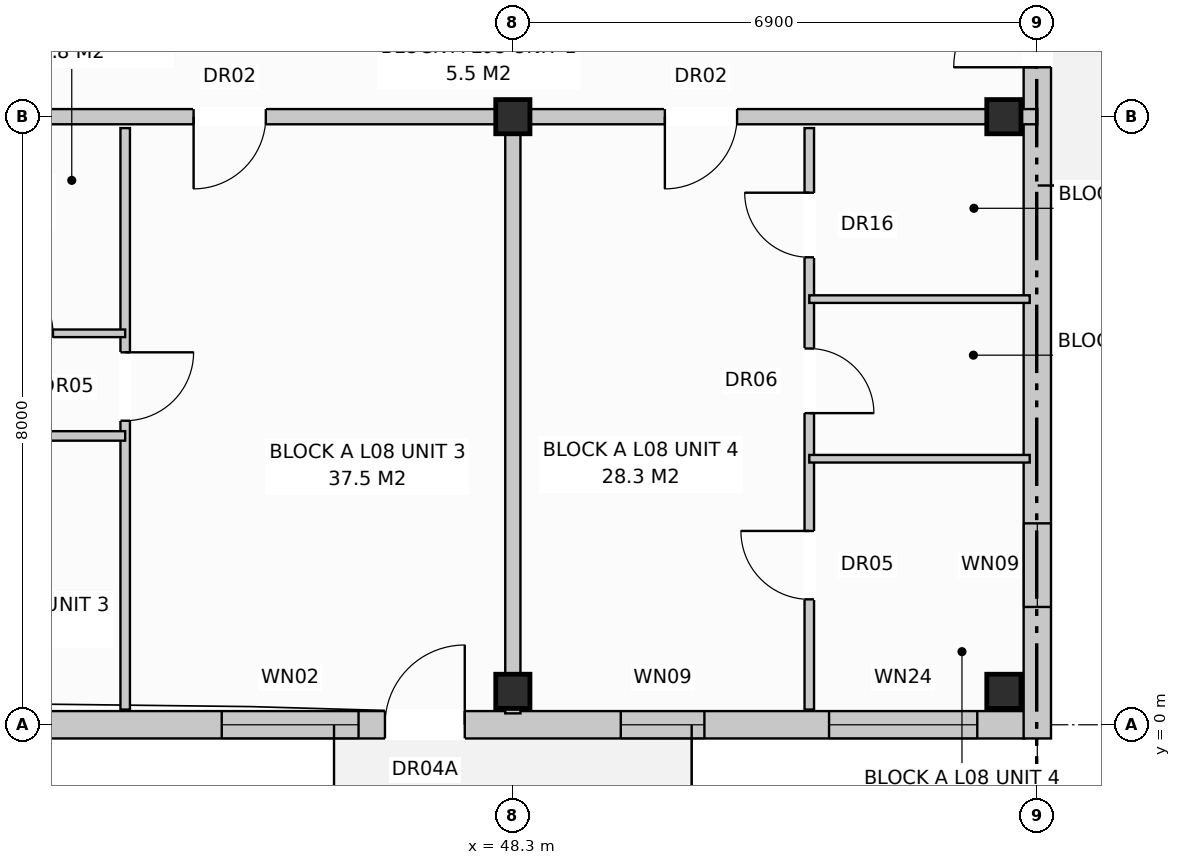
"""IFC4 building model, lengths in metres.
Left out: names, types, materials, properties, quantities, classifications, styles, units other than length and angle.
Written with IfcOpenShell. Run it as: python <this file> out.ifc"""

import sys

from ifc_helpers import new_model, si_unit, direction, frame, frame_2d, origin, origin_with_axes, origin_2d, place, context, subcontext, project, spatial, rectangle, extrude, element, fill, save


model = new_model("IFC4")
c1 = context("Model", 3, precision=1e-05, world=origin(), true_north=direction((0.0, 1.0)))
c2 = subcontext(c1, "Body", "Model", "MODEL_VIEW")
j1 = project(units=[si_unit("LENGTHUNIT", "METRE"), si_unit("PLANEANGLEUNIT", "RADIAN")], contexts=[c1])
p1 = place(None, origin())
s1 = spatial("IfcSite", under=j1, at=p1, CompositionType="ELEMENT")
p2 = place(p1, origin())
s2 = spatial("IfcBuilding", under=s1, at=p2, CompositionType="ELEMENT")
p3 = place(p2, frame((0.0, 0.0, 27.2)))
s3 = spatial("IfcBuildingStorey", under=s2, at=p3, CompositionType="ELEMENT", Elevation=27.2)
for number, where, z_axis, x_axis in (
    (1, (48.3, 0.44, 0.0), (0.0, 0.0, 1.0), (1.0, 0.0, 0.0)),
    (2, (48.3, 8.0, 0.0), (0.0, 0.0, 1.0), (1.0, 0.0, 0.0)),
    (3, (54.76, 0.44, 0.0), (0.0, 0.0, 1.0), (1.0, 0.0, 0.0)),
    (4, (54.76, 8.0, 0.0), (0.0, 0.0, 1.0), (1.0, 0.0, 0.0)),
):
    element("IfcColumn", number, at=place(p3, frame(where, z_axis=z_axis, x_axis=x_axis)), inside=s3, PredefinedType="COLUMN", context=c2, shape_type="SweptSolid", body=[
        extrude(rectangle(XDim=0.45, YDim=0.45, at=origin_2d()), origin(), (0.0, 0.0, 1.0), 3.2),
    ])
p4 = place(p3, frame((0.17, 0.0, 0.0), z_axis=(0.0, 0.0, 1.0), x_axis=(1.0, 0.0, 0.0)))
e5 = element("IfcWall", 5, at=p4, inside=s3, PredefinedType="STANDARD", context=c2, shape_type="SweptSolid", body=[
    extrude(rectangle(XDim=54.86, YDim=0.36, at=frame_2d((27.43, 0.0))), origin(), (0.0, 0.0, 1.0), 2.96),
])
p5 = place(p4, frame((3.75, 0.0, 0.0)))
e6 = element("IfcOpeningElement", 6, at=p5, cuts=e5, PredefinedType="OPENING", context=c2, shape_type="SweptSolid", body=[
    extrude(rectangle(XDim=1.05, YDim=2.12, at=frame_2d((0.525, 1.06))), frame((0.0, 0.192, 0.0), z_axis=(0.0, -1.0, 0.0), x_axis=(1.0, 0.0, 0.0)), (0.0, 0.0, 1.0), 0.384),
])
p6 = place(p4, frame((18.65, 0.0, 0.0)))
e7 = element("IfcOpeningElement", 7, at=p6, cuts=e5, PredefinedType="OPENING", context=c2, shape_type="SweptSolid", body=[
    extrude(rectangle(XDim=1.05, YDim=2.12, at=frame_2d((0.525, 1.06))), frame((0.0, 0.192, 0.0), z_axis=(0.0, -1.0, 0.0), x_axis=(1.0, 0.0, 0.0)), (0.0, 0.0, 1.0), 0.384),
])
p7 = place(p4, frame((29.05, 0.0, 0.0)))
e8 = element("IfcOpeningElement", 8, at=p7, cuts=e5, PredefinedType="OPENING", context=c2, shape_type="SweptSolid", body=[
    extrude(rectangle(XDim=1.05, YDim=2.12, at=frame_2d((0.525, 1.06))), frame((0.0, 0.192, 0.0), z_axis=(0.0, -1.0, 0.0), x_axis=(1.0, 0.0, 0.0)), (0.0, 0.0, 1.0), 0.384),
])
p8 = place(p4, frame((46.447, 0.0, 0.0)))
e9 = element("IfcOpeningElement", 9, at=p8, cuts=e5, PredefinedType="OPENING", context=c2, shape_type="SweptSolid", body=[
    extrude(rectangle(XDim=1.05, YDim=2.12, at=frame_2d((0.525, 1.06))), frame((0.0, 0.192, 0.0), z_axis=(0.0, -1.0, 0.0), x_axis=(1.0, 0.0, 0.0)), (0.0, 0.0, 1.0), 0.384),
])
p9 = place(p4, frame((1.6, 0.0, 0.8)))
e10 = element("IfcOpeningElement", 10, at=p9, cuts=e5, PredefinedType="OPENING", context=c2, shape_type="SweptSolid", body=[
    extrude(rectangle(XDim=1.8, YDim=1.7, at=frame_2d((0.9, 0.85))), frame((0.0, 0.192, 0.0), z_axis=(0.0, -1.0, 0.0), x_axis=(1.0, 0.0, 0.0)), (0.0, 0.0, 1.0), 0.384),
])
p10 = place(p4, frame((7.232, 0.0, 0.72)))
e11 = element("IfcOpeningElement", 11, at=p10, cuts=e5, PredefinedType="OPENING", context=c2, shape_type="SweptSolid", body=[
    extrude(rectangle(XDim=1.9, YDim=1.85, at=frame_2d((0.95, 0.925))), frame((0.0, 0.192, 0.0), z_axis=(0.0, -1.0, 0.0), x_axis=(1.0, 0.0, 0.0)), (0.0, 0.0, 1.0), 0.384),
])
p11 = place(p4, frame((10.85, 0.0, 0.72)))
e12 = element("IfcOpeningElement", 12, at=p11, cuts=e5, PredefinedType="OPENING", context=c2, shape_type="SweptSolid", body=[
    extrude(rectangle(XDim=1.1, YDim=1.5, at=frame_2d((0.55, 0.75))), frame((0.0, 0.192, 0.0), z_axis=(0.0, -1.0, 0.0), x_axis=(1.0, 0.0, 0.0)), (0.0, 0.0, 1.0), 0.384),
])
p12 = place(p4, frame((15.9, 0.0, 0.8)))
e13 = element("IfcOpeningElement", 13, at=p12, cuts=e5, PredefinedType="OPENING", context=c2, shape_type="SweptSolid", body=[
    extrude(rectangle(XDim=1.8, YDim=1.7, at=frame_2d((0.9, 0.85))), frame((0.0, 0.192, 0.0), z_axis=(0.0, -1.0, 0.0), x_axis=(1.0, 0.0, 0.0)), (0.0, 0.0, 1.0), 0.384),
])
p13 = place(p4, frame((21.55, 0.0, 0.72)))
e14 = element("IfcOpeningElement", 14, at=p13, cuts=e5, PredefinedType="OPENING", context=c2, shape_type="SweptSolid", body=[
    extrude(rectangle(XDim=1.9, YDim=1.85, at=frame_2d((0.95, 0.925))), frame((0.0, 0.192, 0.0), z_axis=(0.0, -1.0, 0.0), x_axis=(1.0, 0.0, 0.0)), (0.0, 0.0, 1.0), 0.384),
])
p14 = place(p4, frame((25.6, 0.0, 0.72)))
e15 = element("IfcOpeningElement", 15, at=p14, cuts=e5, PredefinedType="OPENING", context=c2, shape_type="SweptSolid", body=[
    extrude(rectangle(XDim=1.1, YDim=1.5, at=frame_2d((0.55, 0.75))), frame((0.0, 0.192, 0.0), z_axis=(0.0, -1.0, 0.0), x_axis=(1.0, 0.0, 0.0)), (0.0, 0.0, 1.0), 0.384),
])
p15 = place(p4, frame((31.4, 0.0, 0.8)))
e16 = element("IfcOpeningElement", 16, at=p15, cuts=e5, PredefinedType="OPENING", context=c2, shape_type="SweptSolid", body=[
    extrude(rectangle(XDim=1.8, YDim=1.7, at=frame_2d((0.9, 0.85))), frame((0.0, 0.192, 0.0), z_axis=(0.0, -1.0, 0.0), x_axis=(1.0, 0.0, 0.0)), (0.0, 0.0, 1.0), 0.384),
])
p16 = place(p4, frame((35.55, 0.0, 0.72)))
e17 = element("IfcOpeningElement", 17, at=p16, cuts=e5, PredefinedType="OPENING", context=c2, shape_type="SweptSolid", body=[
    extrude(rectangle(XDim=1.9, YDim=1.85, at=frame_2d((0.95, 0.925))), frame((0.0, 0.192, 0.0), z_axis=(0.0, -1.0, 0.0), x_axis=(1.0, 0.0, 0.0)), (0.0, 0.0, 1.0), 0.384),
])
p17 = place(p4, frame((39.25, 0.0, 0.72)))
e18 = element("IfcOpeningElement", 18, at=p17, cuts=e5, PredefinedType="OPENING", context=c2, shape_type="SweptSolid", body=[
    extrude(rectangle(XDim=1.1, YDim=1.5, at=frame_2d((0.55, 0.75))), frame((0.0, 0.192, 0.0), z_axis=(0.0, -1.0, 0.0), x_axis=(1.0, 0.0, 0.0)), (0.0, 0.0, 1.0), 0.384),
])
p18 = place(p4, frame((44.3, 0.0, 0.8)))
e19 = element("IfcOpeningElement", 19, at=p18, cuts=e5, PredefinedType="OPENING", context=c2, shape_type="SweptSolid", body=[
    extrude(rectangle(XDim=1.8, YDim=1.7, at=frame_2d((0.9, 0.85))), frame((0.0, 0.192, 0.0), z_axis=(0.0, -1.0, 0.0), x_axis=(1.0, 0.0, 0.0)), (0.0, 0.0, 1.0), 0.384),
])
p19 = place(p4, frame((49.55, 0.0, 0.72)))
e20 = element("IfcOpeningElement", 20, at=p19, cuts=e5, PredefinedType="OPENING", context=c2, shape_type="SweptSolid", body=[
    extrude(rectangle(XDim=1.1, YDim=1.5, at=frame_2d((0.55, 0.75))), frame((0.0, 0.192, 0.0), z_axis=(0.0, -1.0, 0.0), x_axis=(1.0, 0.0, 0.0)), (0.0, 0.0, 1.0), 0.384),
])
p20 = place(p4, frame((52.29, 0.0, 0.8)))
e21 = element("IfcOpeningElement", 21, at=p20, cuts=e5, PredefinedType="OPENING", context=c2, shape_type="SweptSolid", body=[
    extrude(rectangle(XDim=1.95, YDim=1.65, at=frame_2d((0.975, 0.825))), frame((0.0, 0.192, 0.0), z_axis=(0.0, -1.0, 0.0), x_axis=(1.0, 0.0, 0.0)), (0.0, 0.0, 1.0), 0.384),
])
p21 = place(p3, frame((55.2, -0.18, 0.0), z_axis=(0.0, 0.0, 1.0), x_axis=(0.0, 1.0, 0.0)))
e22 = element("IfcWall", 22, at=p21, inside=s3, PredefinedType="STANDARD", context=c2, shape_type="SweptSolid", body=[
    extrude(rectangle(XDim=18.76, YDim=0.36, at=frame_2d((9.38, 0.0))), origin(), (0.0, 0.0, 1.0), 2.96),
])
p22 = place(p21, frame((8.83, 0.0, 0.0)))
e23 = element("IfcOpeningElement", 23, at=p22, cuts=e22, PredefinedType="OPENING", context=c2, shape_type="SweptSolid", body=[
    extrude(rectangle(XDim=1.1, YDim=2.1, at=frame_2d((0.55, 1.05))), frame((0.0, 0.192, 0.0), z_axis=(0.0, -1.0, 0.0), x_axis=(1.0, 0.0, 0.0)), (0.0, 0.0, 1.0), 0.384),
])
p23 = place(p21, frame((1.73, 0.0, 0.72)))
e24 = element("IfcOpeningElement", 24, at=p23, cuts=e22, PredefinedType="OPENING", context=c2, shape_type="SweptSolid", body=[
    extrude(rectangle(XDim=1.1, YDim=1.5, at=frame_2d((0.55, 0.75))), frame((0.0, 0.192, 0.0), z_axis=(0.0, -1.0, 0.0), x_axis=(1.0, 0.0, 0.0)), (0.0, 0.0, 1.0), 0.384),
])
p24 = place(p21, frame((15.93, 0.0, 0.72)))
e25 = element("IfcOpeningElement", 25, at=p24, cuts=e22, PredefinedType="OPENING", context=c2, shape_type="SweptSolid", body=[
    extrude(rectangle(XDim=1.1, YDim=1.5, at=frame_2d((0.55, 0.75))), frame((0.0, 0.192, 0.0), z_axis=(0.0, -1.0, 0.0), x_axis=(1.0, 0.0, 0.0)), (0.0, 0.0, 1.0), 0.384),
])
p25 = place(p3, frame((48.3, 7.85, 0.0), z_axis=(0.0, 0.0, 1.0), x_axis=(0.0, -1.0, 0.0)))
e26 = element("IfcWall", 26, at=p25, inside=s3, PredefinedType="PARTITIONING", context=c2, shape_type="SweptSolid", body=[
    extrude(rectangle(XDim=7.7, YDim=0.2, at=frame_2d((3.85, 0.0))), origin(), (0.0, 0.0, 1.0), 2.4),
])
p26 = place(p3, frame((34.5, 8.0, 0.0), z_axis=(0.0, 0.0, 1.0), x_axis=(1.0, 0.0, 0.0)))
e27 = element("IfcWall", 27, at=p26, inside=s3, PredefinedType="PARTITIONING", context=c2, shape_type="SweptSolid", body=[
    extrude(rectangle(XDim=13.8, YDim=0.2, at=frame_2d((6.9, 0.0))), origin(), (0.0, 0.0, 1.0), 2.4),
])
p27 = place(p26, frame((9.6, 0.0, 0.0)))
e28 = element("IfcOpeningElement", 28, at=p27, cuts=e27, PredefinedType="OPENING", context=c2, shape_type="SweptSolid", body=[
    extrude(rectangle(XDim=0.95, YDim=2.15, at=frame_2d((0.475, 1.075))), frame((0.0, 0.112, 0.0), z_axis=(0.0, -1.0, 0.0), x_axis=(1.0, 0.0, 0.0)), (0.0, 0.0, 1.0), 0.224),
])
p28 = place(p3, frame((43.2, 7.85, 0.0), z_axis=(0.0, 0.0, 1.0), x_axis=(0.0, -1.0, 0.0)))
e29 = element("IfcWall", 29, at=p28, inside=s3, PredefinedType="PARTITIONING", context=c2, shape_type="SweptSolid", body=[
    extrude(rectangle(XDim=7.65, YDim=0.125, at=frame_2d((3.825, 0.0))), origin(), (0.0, 0.0, 1.0), 2.96),
])
p29 = place(p28, frame((2.95, 0.0, 0.0)))
e30 = element("IfcOpeningElement", 30, at=p29, cuts=e29, PredefinedType="OPENING", context=c2, shape_type="SweptSolid", body=[
    extrude(rectangle(XDim=0.9, YDim=2.1, at=frame_2d((0.45, 1.05))), frame((0.0, 0.074, 0.0), z_axis=(0.0, -1.0, 0.0), x_axis=(1.0, 0.0, 0.0)), (0.0, 0.0, 1.0), 0.149),
])
p30 = place(p3, frame((34.6, 5.15, 0.0), z_axis=(0.0, 0.0, 1.0), x_axis=(1.0, 0.0, 0.0)))
e31 = element("IfcWall", 31, at=p30, inside=s3, PredefinedType="PARTITIONING", context=c2, shape_type="SweptSolid", body=[
    extrude(rectangle(XDim=8.6, YDim=0.1, at=frame_2d((4.3, 0.0))), origin(), (0.0, 0.0, 1.0), 2.96),
])
p31 = place(p30, frame((1.4, 0.0, 0.0)))
e32 = element("IfcOpeningElement", 32, at=p31, cuts=e31, PredefinedType="OPENING", context=c2, shape_type="SweptSolid", body=[
    extrude(rectangle(XDim=0.85, YDim=2.05, at=frame_2d((0.425, 1.025))), frame((0.0, 0.062, 0.0), z_axis=(0.0, -1.0, 0.0), x_axis=(1.0, 0.0, 0.0)), (0.0, 0.0, 1.0), 0.124),
])
p32 = place(p30, frame((4.65, 0.0, 0.0)))
e33 = element("IfcOpeningElement", 33, at=p32, cuts=e31, PredefinedType="OPENING", context=c2, shape_type="SweptSolid", body=[
    extrude(rectangle(XDim=0.85, YDim=2.05, at=frame_2d((0.425, 1.025))), frame((0.0, 0.062, 0.0), z_axis=(0.0, -1.0, 0.0), x_axis=(1.0, 0.0, 0.0)), (0.0, 0.0, 1.0), 0.124),
])
p33 = place(p30, frame((6.8, 0.0, 0.0)))
e34 = element("IfcOpeningElement", 34, at=p33, cuts=e31, PredefinedType="OPENING", context=c2, shape_type="SweptSolid", body=[
    extrude(rectangle(XDim=0.85, YDim=2.1, at=frame_2d((0.425, 1.05))), frame((0.0, 0.062, 0.0), z_axis=(0.0, -1.0, 0.0), x_axis=(1.0, 0.0, 0.0)), (0.0, 0.0, 1.0), 0.124),
])
p34 = place(p3, frame((38.7, 3.8, 0.0), z_axis=(0.0, 0.0, 1.0), x_axis=(1.0, 0.0, 0.0)))
e35 = element("IfcWall", 35, at=p34, inside=s3, PredefinedType="PARTITIONING", context=c2, shape_type="SweptSolid", body=[
    extrude(rectangle(XDim=4.5, YDim=0.125, at=frame_2d((2.25, 0.0))), origin(), (0.0, 0.0, 1.0), 2.96),
])
p35 = place(p34, frame((1.6, 0.0, 0.0)))
e36 = element("IfcOpeningElement", 36, at=p35, cuts=e35, PredefinedType="OPENING", context=c2, shape_type="SweptSolid", body=[
    extrude(rectangle(XDim=0.9, YDim=2.1, at=frame_2d((0.45, 1.05))), frame((0.0, 0.074, 0.0), z_axis=(0.0, -1.0, 0.0), x_axis=(1.0, 0.0, 0.0)), (0.0, 0.0, 1.0), 0.149),
])
p36 = place(p3, frame((48.3, 8.0, 0.0), z_axis=(0.0, 0.0, 1.0), x_axis=(1.0, 0.0, 0.0)))
e37 = element("IfcWall", 37, at=p36, inside=s3, PredefinedType="PARTITIONING", context=c2, shape_type="SweptSolid", body=[
    extrude(rectangle(XDim=6.9, YDim=0.2, at=frame_2d((3.45, 0.0))), origin(), (0.0, 0.0, 1.0), 2.4),
])
p37 = place(p36, frame((2.0, 0.0, 0.0)))
e38 = element("IfcOpeningElement", 38, at=p37, cuts=e37, PredefinedType="OPENING", context=c2, shape_type="SweptSolid", body=[
    extrude(rectangle(XDim=0.95, YDim=2.15, at=frame_2d((0.475, 1.075))), frame((0.0, 0.112, 0.0), z_axis=(0.0, -1.0, 0.0), x_axis=(1.0, 0.0, 0.0)), (0.0, 0.0, 1.0), 0.224),
])
p38 = place(p3, frame((52.2, 7.85, 0.0), z_axis=(0.0, 0.0, 1.0), x_axis=(0.0, -1.0, 0.0)))
e39 = element("IfcWall", 39, at=p38, inside=s3, PredefinedType="PARTITIONING", context=c2, shape_type="SweptSolid", body=[
    extrude(rectangle(XDim=7.65, YDim=0.125, at=frame_2d((3.825, 0.0))), origin(), (0.0, 0.0, 1.0), 2.96),
])
p39 = place(p38, frame((0.85, 0.0, 0.0)))
e40 = element("IfcOpeningElement", 40, at=p39, cuts=e39, PredefinedType="OPENING", context=c2, shape_type="SweptSolid", body=[
    extrude(rectangle(XDim=0.85, YDim=2.1, at=frame_2d((0.425, 1.05))), frame((0.0, 0.074, 0.0), z_axis=(0.0, -1.0, 0.0), x_axis=(1.0, 0.0, 0.0)), (0.0, 0.0, 1.0), 0.149),
])
p40 = place(p38, frame((2.9, 0.0, 0.0)))
e41 = element("IfcOpeningElement", 41, at=p40, cuts=e39, PredefinedType="OPENING", context=c2, shape_type="SweptSolid", body=[
    extrude(rectangle(XDim=0.85, YDim=2.05, at=frame_2d((0.425, 1.025))), frame((0.0, 0.074, 0.0), z_axis=(0.0, -1.0, 0.0), x_axis=(1.0, 0.0, 0.0)), (0.0, 0.0, 1.0), 0.149),
])
p41 = place(p38, frame((5.3, 0.0, 0.0)))
e42 = element("IfcOpeningElement", 42, at=p41, cuts=e39, PredefinedType="OPENING", context=c2, shape_type="SweptSolid", body=[
    extrude(rectangle(XDim=0.9, YDim=2.1, at=frame_2d((0.45, 1.05))), frame((0.0, 0.074, 0.0), z_axis=(0.0, -1.0, 0.0), x_axis=(1.0, 0.0, 0.0)), (0.0, 0.0, 1.0), 0.149),
])
for number, where, z_axis, x_axis in (
    (43, (52.2, 5.6, 0.0), (0.0, 0.0, 1.0), (1.0, 0.0, 0.0)),
    (44, (52.2, 3.5, 0.0), (0.0, 0.0, 1.0), (1.0, 0.0, 0.0)),
):
    element("IfcWall", number, at=place(p3, frame(where, z_axis=z_axis, x_axis=x_axis)), inside=s3, PredefinedType="PARTITIONING", context=c2, shape_type="SweptSolid", body=[
        extrude(rectangle(XDim=2.9, YDim=0.1, at=frame_2d((1.45, 0.0))), origin(), (0.0, 0.0, 1.0), 2.96),
    ])
p42 = place(p8, origin_with_axes())
e45 = element("IfcDoor", 45, at=p42, inside=s3, OperationType="SINGLE_SWING_RIGHT", PredefinedType="DOOR", context=c2, shape_type="SweptSolid", body=[
    extrude(rectangle(XDim=1.05, YDim=2.12, at=frame_2d((0.525, 1.06))), frame((0.0, 0.025, 0.0), z_axis=(0.0, -1.0, 0.0), x_axis=(1.0, 0.0, 0.0)), (0.0, 0.0, 1.0), 0.05),
])
fill(e9, e45)
p43 = place(p18, origin_with_axes())
e46 = element("IfcWindow", 46, at=p43, inside=s3, PartitioningType="SINGLE_PANEL", PredefinedType="WINDOW", context=c2, shape_type="SweptSolid", body=[
    extrude(rectangle(XDim=1.8, YDim=1.7, at=frame_2d((0.9, 0.85))), frame((0.0, 0.03, 0.0), z_axis=(0.0, -1.0, 0.0), x_axis=(1.0, 0.0, 0.0)), (0.0, 0.0, 1.0), 0.06),
])
fill(e19, e46)
p44 = place(p19, origin_with_axes())
e47 = element("IfcWindow", 47, at=p44, inside=s3, PartitioningType="SINGLE_PANEL", PredefinedType="WINDOW", context=c2, shape_type="SweptSolid", body=[
    extrude(rectangle(XDim=1.1, YDim=1.5, at=frame_2d((0.55, 0.75))), frame((0.0, 0.03, 0.0), z_axis=(0.0, -1.0, 0.0), x_axis=(1.0, 0.0, 0.0)), (0.0, 0.0, 1.0), 0.06),
])
fill(e20, e47)
p45 = place(p20, origin_with_axes())
e48 = element("IfcWindow", 48, at=p45, inside=s3, PartitioningType="SINGLE_PANEL", PredefinedType="WINDOW", context=c2, shape_type="SweptSolid", body=[
    extrude(rectangle(XDim=1.95, YDim=1.65, at=frame_2d((0.975, 0.825))), frame((0.0, 0.03, 0.0), z_axis=(0.0, -1.0, 0.0), x_axis=(1.0, 0.0, 0.0)), (0.0, 0.0, 1.0), 0.06),
])
fill(e21, e48)
p46 = place(p22, origin_with_axes())
e49 = element("IfcDoor", 49, at=p46, inside=s3, OperationType="SINGLE_SWING_LEFT", PredefinedType="DOOR", context=c2, shape_type="SweptSolid", body=[
    extrude(rectangle(XDim=1.1, YDim=2.1, at=frame_2d((0.55, 1.05))), frame((0.0, 0.025, 0.0), z_axis=(0.0, -1.0, 0.0), x_axis=(1.0, 0.0, 0.0)), (0.0, 0.0, 1.0), 0.05),
])
fill(e23, e49)
p47 = place(p23, origin_with_axes())
e50 = element("IfcWindow", 50, at=p47, inside=s3, PartitioningType="SINGLE_PANEL", PredefinedType="WINDOW", context=c2, shape_type="SweptSolid", body=[
    extrude(rectangle(XDim=1.1, YDim=1.5, at=frame_2d((0.55, 0.75))), frame((0.0, 0.03, 0.0), z_axis=(0.0, -1.0, 0.0), x_axis=(1.0, 0.0, 0.0)), (0.0, 0.0, 1.0), 0.06),
])
fill(e24, e50)
p48 = place(p27, frame((0.95, 0.0, 0.0), z_axis=(0.0, 0.0, 1.0), x_axis=(-1.0, 0.0, 0.0)))
e51 = element("IfcDoor", 51, at=p48, inside=s3, OperationType="SINGLE_SWING_LEFT", PredefinedType="DOOR", context=c2, shape_type="SweptSolid", body=[
    extrude(rectangle(XDim=0.95, YDim=2.15, at=frame_2d((0.475, 1.075))), frame((0.0, 0.025, 0.0), z_axis=(0.0, -1.0, 0.0), x_axis=(1.0, 0.0, 0.0)), (0.0, 0.0, 1.0), 0.05),
])
fill(e28, e51)
p49 = place(p29, origin_with_axes())
e52 = element("IfcDoor", 52, at=p49, inside=s3, OperationType="SINGLE_SWING_LEFT", PredefinedType="DOOR", context=c2, shape_type="SweptSolid", body=[
    extrude(rectangle(XDim=0.9, YDim=2.1, at=frame_2d((0.45, 1.05))), frame((0.0, 0.025, 0.0), z_axis=(0.0, -1.0, 0.0), x_axis=(1.0, 0.0, 0.0)), (0.0, 0.0, 1.0), 0.05),
])
fill(e30, e52)
p50 = place(p33, origin_with_axes())
e53 = element("IfcDoor", 53, at=p50, inside=s3, OperationType="SINGLE_SWING_LEFT", PredefinedType="DOOR", context=c2, shape_type="SweptSolid", body=[
    extrude(rectangle(XDim=0.85, YDim=2.1, at=frame_2d((0.425, 1.05))), frame((0.0, 0.025, 0.0), z_axis=(0.0, -1.0, 0.0), x_axis=(1.0, 0.0, 0.0)), (0.0, 0.0, 1.0), 0.05),
])
fill(e34, e53)
p51 = place(p37, frame((0.95, 0.0, 0.0), z_axis=(0.0, 0.0, 1.0), x_axis=(-1.0, 0.0, 0.0)))
e54 = element("IfcDoor", 54, at=p51, inside=s3, OperationType="SINGLE_SWING_LEFT", PredefinedType="DOOR", context=c2, shape_type="SweptSolid", body=[
    extrude(rectangle(XDim=0.95, YDim=2.15, at=frame_2d((0.475, 1.075))), frame((0.0, 0.025, 0.0), z_axis=(0.0, -1.0, 0.0), x_axis=(1.0, 0.0, 0.0)), (0.0, 0.0, 1.0), 0.05),
])
fill(e38, e54)
p52 = place(p39, frame((0.85, 0.0, 0.0), z_axis=(0.0, 0.0, 1.0), x_axis=(-1.0, 0.0, 0.0)))
e55 = element("IfcDoor", 55, at=p52, inside=s3, OperationType="SINGLE_SWING_LEFT", PredefinedType="DOOR", context=c2, shape_type="SweptSolid", body=[
    extrude(rectangle(XDim=0.85, YDim=2.1, at=frame_2d((0.425, 1.05))), frame((0.0, 0.025, 0.0), z_axis=(0.0, -1.0, 0.0), x_axis=(1.0, 0.0, 0.0)), (0.0, 0.0, 1.0), 0.05),
])
fill(e40, e55)
p53 = place(p40, origin_with_axes())
e56 = element("IfcDoor", 56, at=p53, inside=s3, OperationType="SINGLE_SWING_RIGHT", PredefinedType="DOOR", context=c2, shape_type="SweptSolid", body=[
    extrude(rectangle(XDim=0.85, YDim=2.05, at=frame_2d((0.425, 1.025))), frame((0.0, 0.025, 0.0), z_axis=(0.0, -1.0, 0.0), x_axis=(1.0, 0.0, 0.0)), (0.0, 0.0, 1.0), 0.05),
])
fill(e41, e56)
p54 = place(p41, frame((0.9, 0.0, 0.0), z_axis=(0.0, 0.0, 1.0), x_axis=(-1.0, 0.0, 0.0)))
e57 = element("IfcDoor", 57, at=p54, inside=s3, OperationType="SINGLE_SWING_LEFT", PredefinedType="DOOR", context=c2, shape_type="SweptSolid", body=[
    extrude(rectangle(XDim=0.9, YDim=2.1, at=frame_2d((0.45, 1.05))), frame((0.0, 0.025, 0.0), z_axis=(0.0, -1.0, 0.0), x_axis=(1.0, 0.0, 0.0)), (0.0, 0.0, 1.0), 0.05),
])
fill(e42, e57)
save(model, sys.argv[1])
